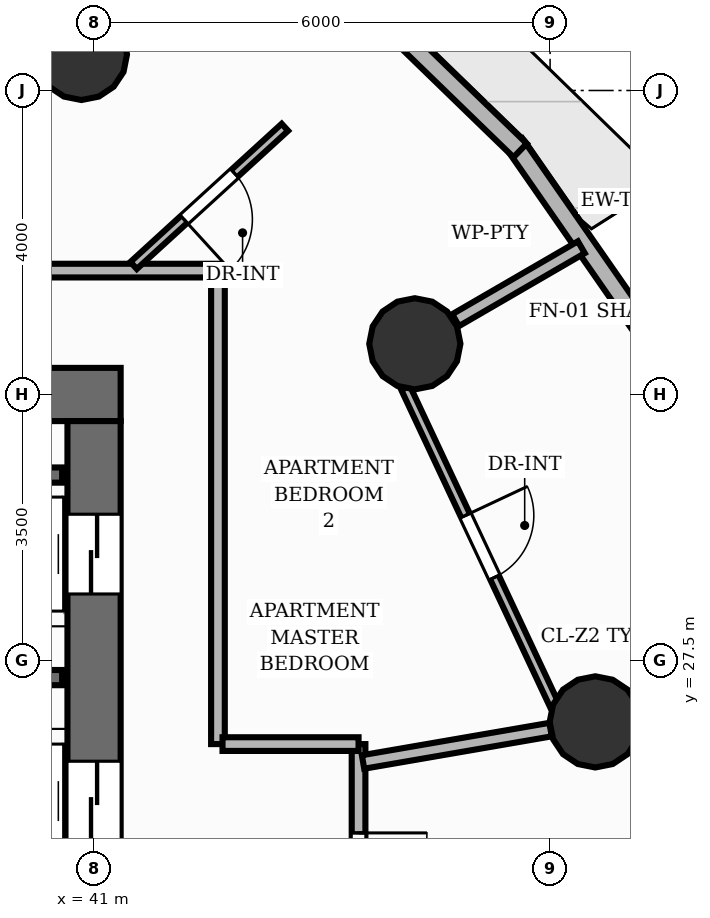
"""IFC4 building model, lengths in metres.
Left out: names, types, materials, properties, quantities, classifications, styles, units other than length and angle.
Written with IfcOpenShell. Run it as: python <this file> out.ifc"""

import sys

from ifc_helpers import new_model, si_unit, direction, frame, frame_2d, origin, origin_2d, place, context, subcontext, project, spatial, rectangle, circle, extrude, element, fill, save


model = new_model("IFC4")
c1 = context("Model", 3, precision=1e-05, world=origin(), true_north=direction((0.0, 1.0)))
c2 = subcontext(c1, "Body", "Model", "MODEL_VIEW")
j1 = project(units=[si_unit("LENGTHUNIT", "METRE"), si_unit("PLANEANGLEUNIT", "RADIAN")], contexts=[c1])
p1 = place(None, origin())
s1 = spatial("IfcSite", under=j1, at=p1, CompositionType="ELEMENT")
p2 = place(p1, origin())
s2 = spatial("IfcBuilding", under=s1, at=p2, CompositionType="ELEMENT")
p3 = place(p2, frame((0.0, 0.0, 80.48)))
s3 = spatial("IfcBuildingStorey", under=s2, at=p3, CompositionType="ELEMENT", Elevation=80.48)
p4 = place(p3, frame((22.65, 31.0, 0.0), z_axis=(0.0, 0.0, 1.0), x_axis=(1.0, 0.0, 0.0)))
e1 = element("IfcWall", 1, at=p4, inside=s3, PredefinedType="SHEAR", context=c2, shape_type="SweptSolid", body=[
    extrude(rectangle(XDim=18.7, YDim=0.7, at=frame_2d((9.35, 0.0))), origin(), (0.0, 0.0, 1.0), 3.2),
])
p5 = place(p4, frame((11.75, 0.0, 0.0)))
e2 = element("IfcOpeningElement", 2, at=p5, cuts=e1, PredefinedType="OPENING", context=c2, shape_type="SweptSolid", body=[
    extrude(rectangle(XDim=1.1, YDim=2.15, at=frame_2d((0.55, 1.075))), frame((0.0, 0.36, 0.0), z_axis=(0.0, -1.0, 0.0), x_axis=(1.0, 0.0, 0.0)), (0.0, 0.0, 1.0), 0.72),
])
p6 = place(p3, frame((41.0, 17.35, 0.0), z_axis=(0.0, 0.0, 1.0), x_axis=(0.0, 1.0, 0.0)))
e3 = element("IfcWall", 3, at=p6, inside=s3, PredefinedType="SHEAR", context=c2, shape_type="SweptSolid", body=[
    extrude(rectangle(XDim=13.3, YDim=0.7, at=frame_2d((6.65, 0.0))), origin(), (0.0, 0.0, 1.0), 3.2),
])
p7 = place(p6, frame((1.225, 0.0, 0.0)))
e4 = element("IfcOpeningElement", 4, at=p7, cuts=e3, PredefinedType="OPENING", context=c2, shape_type="SweptSolid", body=[
    extrude(rectangle(XDim=1.05, YDim=2.15, at=frame_2d((0.525, 1.075))), frame((0.0, 0.36, 0.0), z_axis=(0.0, -1.0, 0.0), x_axis=(1.0, 0.0, 0.0)), (0.0, 0.0, 1.0), 0.72),
])
p8 = place(p6, frame((4.475, 0.0, 0.0)))
e5 = element("IfcOpeningElement", 5, at=p8, cuts=e3, PredefinedType="OPENING", context=c2, shape_type="SweptSolid", body=[
    extrude(rectangle(XDim=1.05, YDim=2.15, at=frame_2d((0.525, 1.075))), frame((0.0, 0.36, 0.0), z_axis=(0.0, -1.0, 0.0), x_axis=(1.0, 0.0, 0.0)), (0.0, 0.0, 1.0), 0.72),
])
p9 = place(p6, frame((7.775, 0.0, 0.0)))
e6 = element("IfcOpeningElement", 6, at=p9, cuts=e3, PredefinedType="OPENING", context=c2, shape_type="SweptSolid", body=[
    extrude(rectangle(XDim=1.05, YDim=2.15, at=frame_2d((0.525, 1.075))), frame((0.0, 0.36, 0.0), z_axis=(0.0, -1.0, 0.0), x_axis=(1.0, 0.0, 0.0)), (0.0, 0.0, 1.0), 0.72),
])
p10 = place(p6, frame((11.025, 0.0, 0.0)))
e7 = element("IfcOpeningElement", 7, at=p10, cuts=e3, PredefinedType="OPENING", context=c2, shape_type="SweptSolid", body=[
    extrude(rectangle(XDim=1.05, YDim=2.15, at=frame_2d((0.525, 1.075))), frame((0.0, 0.36, 0.0), z_axis=(0.0, -1.0, 0.0), x_axis=(1.0, 0.0, 0.0)), (0.0, 0.0, 1.0), 0.72),
])
for number, where, z_axis, x_axis in (
    (8, (47.594, 26.692, 0.0), (0.0, 0.0, 1.0), (1.0, 0.0, 0.0)),
    (9, (45.22, 31.667, 0.0), (0.0, 0.0, 1.0), (1.0, 0.0, 0.0)),
    (10, (40.833, 35.474, 0.0), (0.0, 0.0, 1.0), (1.0, 0.0, 0.0)),
):
    element("IfcColumn", number, at=place(p3, frame(where, z_axis=z_axis, x_axis=x_axis)), inside=s3, PredefinedType="COLUMN", context=c2, shape_type="SweptSolid", body=[
        extrude(circle(Radius=0.6, at=origin_2d()), origin(), (0.0, 0.0, 1.0), 3.2),
    ])
p11 = place(p3, frame((46.532, 34.298, 0.0), z_axis=(0.0, 0.0, 1.0), x_axis=(0.570574087236, -0.821246133005, 0.0)))
e11 = element("IfcWall", 11, at=p11, inside=s3, PredefinedType="SOLIDWALL", context=c2, shape_type="SweptSolid", body=[
    extrude(rectangle(XDim=2.874, YDim=0.25, at=frame_2d((1.437, 0.0))), origin(), (0.0, 0.0, 1.0), 2.96),
])
p12 = place(p3, frame((44.507, 36.247, 0.0), z_axis=(0.0, 0.0, 1.0), x_axis=(0.717880157086, -0.696166704219, 0.0)))
e12 = element("IfcWall", 12, at=p12, inside=s3, PredefinedType="SOLIDWALL", context=c2, shape_type="SweptSolid", body=[
    extrude(rectangle(XDim=2.923, YDim=0.25, at=frame_2d((1.462, 0.0))), origin(), (0.0, 0.0, 1.0), 2.96),
])
for number, where, z_axis, x_axis in (
    (13, (38.87, 29.94, 0.0), (0.0, 0.0, 1.0), (1.0, 0.0, 0.0)),
    (14, (38.87, 27.275, 0.0), (0.0, 0.0, 1.0), (1.0, 0.0, 0.0)),
):
    element("IfcWall", number, at=place(p3, frame(where, z_axis=z_axis, x_axis=x_axis)), inside=s3, PredefinedType="SHEAR", context=c2, shape_type="SweptSolid", body=[
        extrude(rectangle(XDim=1.71, YDim=0.2, at=frame_2d((0.855, 0.0))), origin(), (0.0, 0.0, 1.0), 3.2),
    ])
p13 = place(p3, frame((45.757, 31.978, 0.0), z_axis=(0.0, 0.0, 1.0), x_axis=(0.86503562166, 0.501710447628, 0.0)))
e15 = element("IfcWall", 15, at=p13, inside=s3, PredefinedType="PARTITIONING", context=c2, shape_type="SweptSolid", body=[
    extrude(rectangle(XDim=1.912, YDim=0.18, at=frame_2d((0.956, 0.0))), origin(), (0.0, 0.0, 1.0), 2.26),
])
p14 = place(p3, frame((44.48, 26.4, 0.0), z_axis=(0.0, 0.0, 1.0), x_axis=(0.0, -1.0, 0.0)))
e16 = element("IfcWall", 16, at=p14, inside=s3, PredefinedType="PARTITIONING", context=c2, shape_type="SweptSolid", body=[
    extrude(rectangle(XDim=4.8, YDim=0.18, at=frame_2d((2.4, 0.0))), origin(), (0.0, 0.0, 1.0), 2.955),
])
p15 = place(p14, frame((1.169, 0.0, 0.0)))
e17 = element("IfcOpeningElement", 17, at=p15, cuts=e16, PredefinedType="OPENING", context=c2, shape_type="SweptSolid", body=[
    extrude(rectangle(XDim=0.9, YDim=2.1, at=frame_2d((0.45, 1.05))), frame((0.0, 0.1, 0.0), z_axis=(0.0, -1.0, 0.0), x_axis=(1.0, 0.0, 0.0)), (0.0, 0.0, 1.0), 0.2),
])
p16 = place(p3, frame((26.431, 32.63, 0.0), z_axis=(0.0, 0.0, 1.0), x_axis=(1.0, 0.0, 0.0)))
e18 = element("IfcWall", 18, at=p16, inside=s3, PredefinedType="PARTITIONING", context=c2, shape_type="SweptSolid", body=[
    extrude(rectangle(XDim=16.199, YDim=0.18, at=frame_2d((8.099, 0.0))), origin(), (0.0, 0.0, 1.0), 2.955),
])
p17 = place(p16, frame((11.645, 0.0, 0.0)))
e19 = element("IfcOpeningElement", 19, at=p17, cuts=e18, PredefinedType="OPENING", context=c2, shape_type="SweptSolid", body=[
    extrude(rectangle(XDim=1.05, YDim=2.15, at=frame_2d((0.525, 1.075))), frame((0.0, 0.1, 0.0), z_axis=(0.0, -1.0, 0.0), x_axis=(1.0, 0.0, 0.0)), (0.0, 0.0, 1.0), 0.2),
])
p18 = place(p3, frame((42.63, 32.63, 0.0), z_axis=(0.0, 0.0, 1.0), x_axis=(0.0, -1.0, 0.0)))
e20 = element("IfcWall", 20, at=p18, inside=s3, PredefinedType="PARTITIONING", context=c2, shape_type="SweptSolid", body=[
    extrude(rectangle(XDim=6.23, YDim=0.18, at=frame_2d((3.115, 0.0))), origin(), (0.0, 0.0, 1.0), 2.955),
])
p19 = place(p3, frame((42.69, 26.4, 0.0), z_axis=(0.0, 0.0, 1.0), x_axis=(1.0, 0.0, 0.0)))
e21 = element("IfcWall", 21, at=p19, inside=s3, PredefinedType="PARTITIONING", context=c2, shape_type="SweptSolid", body=[
    extrude(rectangle(XDim=1.79, YDim=0.18, at=frame_2d((0.895, 0.0))), origin(), (0.0, 0.0, 1.0), 2.26),
])
p20 = place(p3, frame((44.539, 26.165, 0.0), z_axis=(0.0, 0.0, 1.0), x_axis=(0.985420684403, 0.170135460006, 0.0)))
e22 = element("IfcWall", 22, at=p20, inside=s3, PredefinedType="PARTITIONING", context=c2, shape_type="SweptSolid", body=[
    extrude(rectangle(XDim=2.504, YDim=0.18, at=frame_2d((1.252, 0.0))), origin(), (0.0, 0.0, 1.0), 2.26),
])
p21 = place(p3, frame((43.511, 34.516, 0.0), z_axis=(0.0, 0.0, 1.0), x_axis=(-0.738303163636, -0.674469004896, 0.0)))
e23 = element("IfcWall", 23, at=p21, inside=s3, PredefinedType="PARTITIONING", context=c2, shape_type="SweptSolid", body=[
    extrude(rectangle(XDim=2.696, YDim=0.125, at=frame_2d((1.348, 0.0))), origin(), (0.0, 0.0, 1.0), 2.955),
])
p22 = place(p21, frame((0.898, 0.0, 0.0)))
e24 = element("IfcOpeningElement", 24, at=p22, cuts=e23, PredefinedType="OPENING", context=c2, shape_type="SweptSolid", body=[
    extrude(rectangle(XDim=0.9, YDim=2.1, at=frame_2d((0.45, 1.05))), frame((0.0, 0.073, 0.0), z_axis=(0.0, -1.0, 0.0), x_axis=(1.0, 0.0, 0.0)), (0.0, 0.0, 1.0), 0.145),
])
p23 = place(p3, frame((45.098, 31.087, 0.0), z_axis=(0.0, 0.0, 1.0), x_axis=(0.424725570062, -0.905322147158, 0.0)))
e25 = element("IfcWall", 25, at=p23, inside=s3, PredefinedType="PARTITIONING", context=c2, shape_type="SweptSolid", body=[
    extrude(rectangle(XDim=4.61, YDim=0.125, at=frame_2d((2.305, 0.0))), origin(), (0.0, 0.0, 1.0), 2.955),
])
p24 = place(p23, frame((1.855, 0.0, 0.0)))
e26 = element("IfcOpeningElement", 26, at=p24, cuts=e25, PredefinedType="OPENING", context=c2, shape_type="SweptSolid", body=[
    extrude(rectangle(XDim=0.9, YDim=2.1, at=frame_2d((0.45, 1.05))), frame((0.0, 0.073, 0.0), z_axis=(0.0, -1.0, 0.0), x_axis=(1.0, 0.0, 0.0)), (0.0, 0.0, 1.0), 0.145),
])
p25 = place(p9, origin())
e27 = element("IfcDoor", 27, at=p25, inside=s3, OperationType="DOUBLE_DOOR_SLIDING", PredefinedType="DOOR", context=c2, shape_type="SweptSolid", body=[
    extrude(rectangle(XDim=1.05, YDim=2.15, at=frame_2d((0.525, 1.075))), frame((0.0, 0.025, 0.0), z_axis=(0.0, -1.0, 0.0), x_axis=(1.0, 0.0, 0.0)), (0.0, 0.0, 1.0), 0.05),
])
fill(e6, e27)
p26 = place(p10, origin())
e28 = element("IfcDoor", 28, at=p26, inside=s3, OperationType="DOUBLE_DOOR_SLIDING", PredefinedType="DOOR", context=c2, shape_type="SweptSolid", body=[
    extrude(rectangle(XDim=1.05, YDim=2.15, at=frame_2d((0.525, 1.075))), frame((0.0, 0.025, 0.0), z_axis=(0.0, -1.0, 0.0), x_axis=(1.0, 0.0, 0.0)), (0.0, 0.0, 1.0), 0.05),
])
fill(e7, e28)
p27 = place(p15, origin())
e29 = element("IfcDoor", 29, at=p27, inside=s3, OperationType="SINGLE_SWING_LEFT", PredefinedType="DOOR", context=c2, shape_type="SweptSolid", body=[
    extrude(rectangle(XDim=0.9, YDim=2.1, at=frame_2d((0.45, 1.05))), frame((0.0, 0.025, 0.0), z_axis=(0.0, -1.0, 0.0), x_axis=(1.0, 0.0, 0.0)), (0.0, 0.0, 1.0), 0.05),
])
fill(e17, e29)
p28 = place(p22, origin())
e30 = element("IfcDoor", 30, at=p28, inside=s3, OperationType="SINGLE_SWING_RIGHT", PredefinedType="DOOR", context=c2, shape_type="SweptSolid", body=[
    extrude(rectangle(XDim=0.9, YDim=2.1, at=frame_2d((0.45, 1.05))), frame((0.0, 0.025, 0.0), z_axis=(0.0, -1.0, 0.0), x_axis=(1.0, 0.0, 0.0)), (0.0, 0.0, 1.0), 0.05),
])
fill(e24, e30)
p29 = place(p24, origin())
e31 = element("IfcDoor", 31, at=p29, inside=s3, OperationType="SINGLE_SWING_LEFT", PredefinedType="DOOR", context=c2, shape_type="SweptSolid", body=[
    extrude(rectangle(XDim=0.9, YDim=2.1, at=frame_2d((0.45, 1.05))), frame((0.0, 0.025, 0.0), z_axis=(0.0, -1.0, 0.0), x_axis=(1.0, 0.0, 0.0)), (0.0, 0.0, 1.0), 0.05),
])
fill(e26, e31)
save(model, sys.argv[1])
